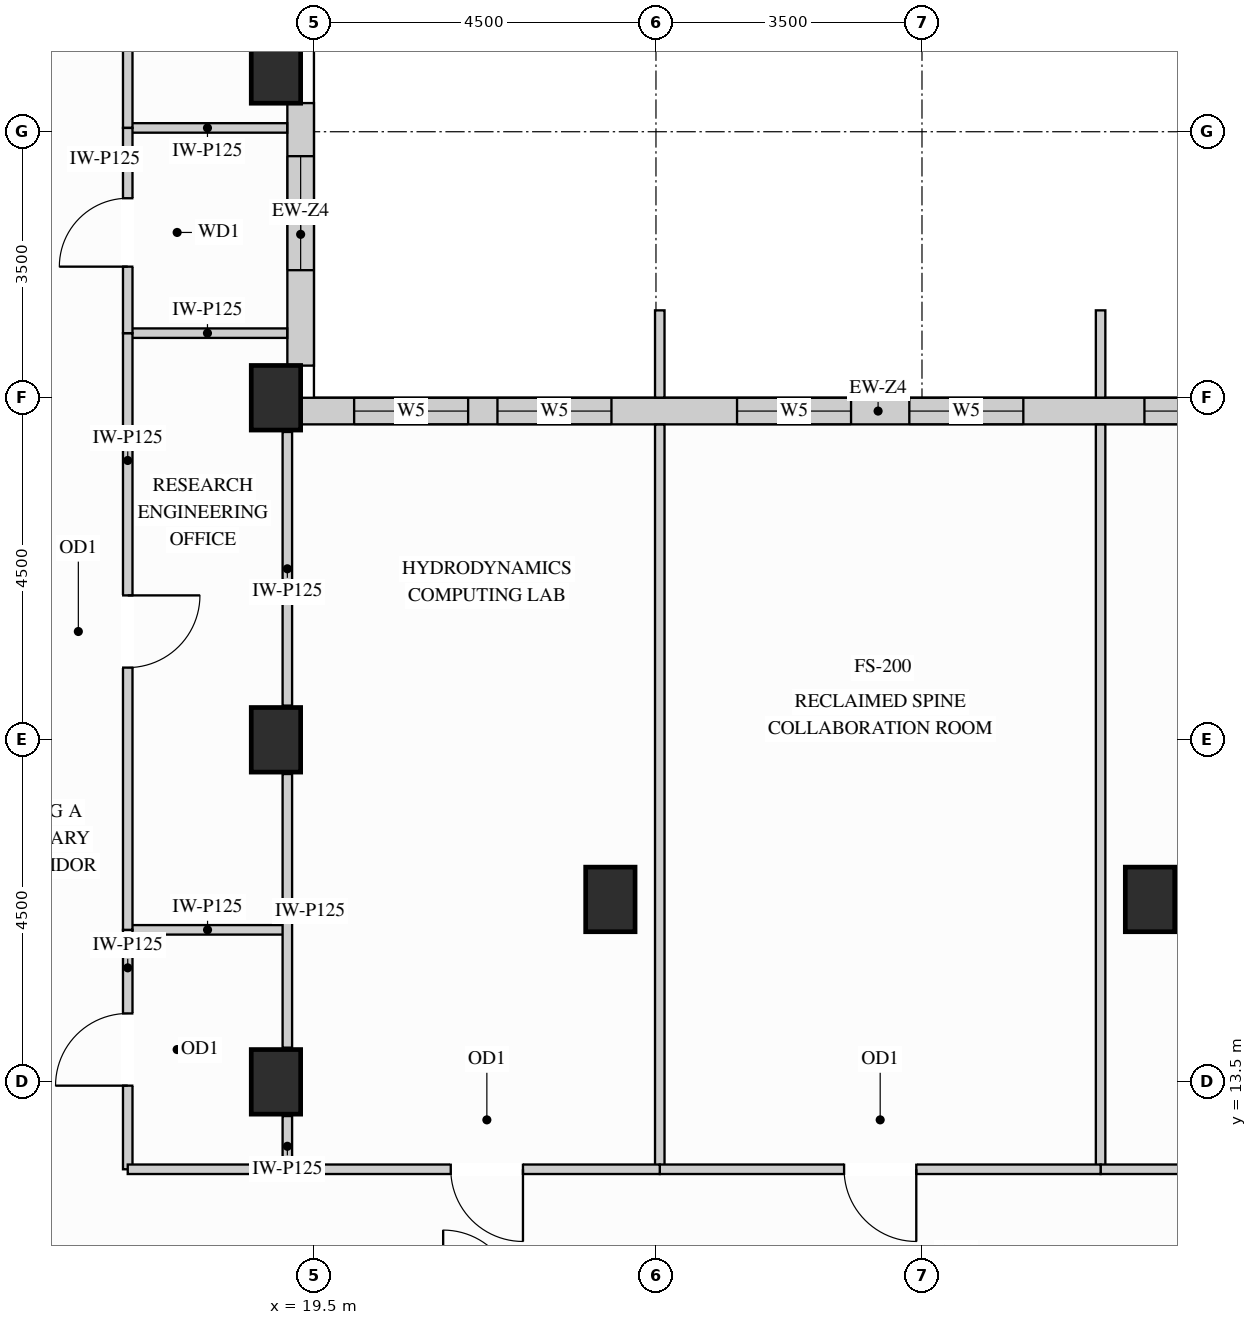
"""IFC4 building model, lengths in metres.
Left out: names, types, materials, properties, quantities, classifications, styles, units other than length and angle.
Written with IfcOpenShell. Run it as: python <this file> out.ifc"""

import sys

from ifc_helpers import new_model, si_unit, direction, frame, frame_2d, origin, origin_2d, place, context, subcontext, project, spatial, rectangle, extrude, source, transform, mapped, element, fill, save


model = new_model("IFC4")
c1 = context("Model", 3, precision=1e-05, world=origin(), true_north=direction((0.0, 1.0)))
c2 = subcontext(c1, "Body", "Model", "MODEL_VIEW")
j1 = project(units=[si_unit("LENGTHUNIT", "METRE"), si_unit("PLANEANGLEUNIT", "RADIAN")], contexts=[c1])
p1 = place(None, origin())
s1 = spatial("IfcSite", under=j1, at=p1, CompositionType="ELEMENT")
p2 = place(p1, origin())
s2 = spatial("IfcBuilding", under=s1, at=p2, CompositionType="ELEMENT")
p3 = place(p2, frame((0.0, 0.0, 252.0)))
s3 = spatial("IfcBuildingStorey", under=s2, at=p3, CompositionType="ELEMENT", Elevation=252.0)
m1 = source(origin(), c2, "Body", "SweptSolid", [
    extrude(rectangle(XDim=0.65, YDim=0.85, at=origin_2d()), origin(), (0.0, 0.0, 1.0), 3.4),
])
for number, where, z_axis, x_axis in (
    (1, (19.0, 13.5, 0.0), (0.0, 0.0, 1.0), (1.0, 0.0, 0.0)),
    (2, (19.0, 18.0, 0.0), (0.0, 0.0, 1.0), (1.0, 0.0, 0.0)),
    (3, (19.0, 22.5, 0.0), (0.0, 0.0, 1.0), (1.0, 0.0, 0.0)),
    (4, (19.0, 26.8, 0.0), (0.0, 0.0, 1.0), (1.0, 0.0, 0.0)),
    (5, (23.4, 15.9, 0.0), (0.0, 0.0, 1.0), (1.0, 0.0, 0.0)),
    (6, (30.5, 15.9, 0.0), (0.0, 0.0, 1.0), (1.0, 0.0, 0.0)),
):
    element("IfcColumn", number, at=place(p3, frame(where, z_axis=z_axis, x_axis=x_axis)), inside=s3, PredefinedType="COLUMN", context=c2, shape_type="MappedRepresentation", body=[
        mapped(m1, transform((0.0, 0.0, 0.0), x_axis=(1.0, 0.0, 0.0), y_axis=(0.0, 1.0, 0.0), z_axis=(0.0, 0.0, 1.0))),
    ])
p4 = place(p3, frame((34.4, 22.325, 0.0), z_axis=(0.0, 0.0, 1.0), x_axis=(-1.0, 0.0, 0.0)))
e7 = element("IfcWall", 7, at=p4, inside=s3, PredefinedType="SOLIDWALL", context=c2, shape_type="SweptSolid", body=[
    extrude(rectangle(XDim=15.077, YDim=0.35, at=frame_2d((7.539, 0.0))), origin(), (0.0, 0.0, 1.0), 3.385),
])
p5 = place(p4, frame((0.647, 0.0, 0.78)))
e8 = element("IfcOpeningElement", 8, at=p5, cuts=e7, PredefinedType="OPENING", context=c2, shape_type="SweptSolid", body=[
    extrude(rectangle(XDim=1.5, YDim=2.0, at=frame_2d((0.75, 1.0))), frame((0.0, 0.185, 0.0), z_axis=(0.0, -1.0, 0.0), x_axis=(1.0, 0.0, 0.0)), (0.0, 0.0, 1.0), 0.37),
])
p6 = place(p4, frame((2.473, 0.0, 0.78)))
e9 = element("IfcOpeningElement", 9, at=p6, cuts=e7, PredefinedType="OPENING", context=c2, shape_type="SweptSolid", body=[
    extrude(rectangle(XDim=1.5, YDim=2.0, at=frame_2d((0.75, 1.0))), frame((0.0, 0.185, 0.0), z_axis=(0.0, -1.0, 0.0), x_axis=(1.0, 0.0, 0.0)), (0.0, 0.0, 1.0), 0.37),
])
p7 = place(p4, frame((5.567, 0.0, 0.78)))
e10 = element("IfcOpeningElement", 10, at=p7, cuts=e7, PredefinedType="OPENING", context=c2, shape_type="SweptSolid", body=[
    extrude(rectangle(XDim=1.5, YDim=2.0, at=frame_2d((0.75, 1.0))), frame((0.0, 0.185, 0.0), z_axis=(0.0, -1.0, 0.0), x_axis=(1.0, 0.0, 0.0)), (0.0, 0.0, 1.0), 0.37),
])
p8 = place(p4, frame((7.833, 0.0, 0.78)))
e11 = element("IfcOpeningElement", 11, at=p8, cuts=e7, PredefinedType="OPENING", context=c2, shape_type="SweptSolid", body=[
    extrude(rectangle(XDim=1.5, YDim=2.0, at=frame_2d((0.75, 1.0))), frame((0.0, 0.185, 0.0), z_axis=(0.0, -1.0, 0.0), x_axis=(1.0, 0.0, 0.0)), (0.0, 0.0, 1.0), 0.37),
])
p9 = place(p4, frame((10.986, 0.0, 0.78)))
e12 = element("IfcOpeningElement", 12, at=p9, cuts=e7, PredefinedType="OPENING", context=c2, shape_type="SweptSolid", body=[
    extrude(rectangle(XDim=1.5, YDim=2.0, at=frame_2d((0.75, 1.0))), frame((0.0, 0.185, 0.0), z_axis=(0.0, -1.0, 0.0), x_axis=(1.0, 0.0, 0.0)), (0.0, 0.0, 1.0), 0.37),
])
p10 = place(p4, frame((12.871, 0.0, 0.78)))
e13 = element("IfcOpeningElement", 13, at=p10, cuts=e7, PredefinedType="OPENING", context=c2, shape_type="SweptSolid", body=[
    extrude(rectangle(XDim=1.5, YDim=2.0, at=frame_2d((0.75, 1.0))), frame((0.0, 0.185, 0.0), z_axis=(0.0, -1.0, 0.0), x_axis=(1.0, 0.0, 0.0)), (0.0, 0.0, 1.0), 0.37),
])
p11 = place(p3, frame((19.325, 22.923, 0.0), z_axis=(0.0, 0.0, 1.0), x_axis=(0.0, 1.0, 0.0)))
e14 = element("IfcWall", 14, at=p11, inside=s3, PredefinedType="SOLIDWALL", context=c2, shape_type="SweptSolid", body=[
    extrude(rectangle(XDim=3.454, YDim=0.35, at=frame_2d((1.727, 0.0))), origin(), (0.0, 0.0, 1.0), 2.619),
])
p12 = place(p11, frame((1.256, 0.0, 0.78)))
e15 = element("IfcOpeningElement", 15, at=p12, cuts=e14, PredefinedType="OPENING", context=c2, shape_type="SweptSolid", body=[
    extrude(rectangle(XDim=1.5, YDim=1.659, at=frame_2d((0.75, 0.83))), frame((0.0, 0.185, 0.0), z_axis=(0.0, -1.0, 0.0), x_axis=(1.0, 0.0, 0.0)), (0.0, 0.0, 1.0), 0.37),
])
m2 = source(origin(), c2, "Body", "SweptSolid", [
    extrude(rectangle(XDim=2.1, YDim=0.125, at=frame_2d((1.05, 0.0))), origin(), (0.0, 0.0, 1.0), 3.385),
])
p13 = place(p3, frame((17.05, 15.5, 0.0), z_axis=(0.0, 0.0, 1.0), x_axis=(1.0, 0.0, 0.0)))
e16 = element("IfcWall", 16, at=p13, inside=s3, PredefinedType="PARTITIONING", context=c2, shape_type="MappedRepresentation", body=[
    mapped(m2, transform((0.0, 0.0, 0.0), x_axis=(1.0, 0.0, 0.0), y_axis=(0.0, 1.0, 0.0), z_axis=(0.0, 0.0, 1.0))),
])
m3 = source(origin(), c2, "Body", "SweptSolid", [
    extrude(rectangle(XDim=2.098, YDim=0.125, at=frame_2d((1.049, 0.0))), origin(), (0.0, 0.0, 1.0), 3.385),
])
for number, where, z_axis, x_axis in (
    (17, (17.05, 23.35, 0.0), (0.0, 0.0, 1.0), (1.0, 0.0, 0.0)),
    (18, (17.05, 26.05, 0.0), (0.0, 0.0, 1.0), (1.0, 0.0, 0.0)),
):
    element("IfcWall", number, at=place(p3, frame(where, z_axis=z_axis, x_axis=x_axis)), inside=s3, PredefinedType="PARTITIONING", context=c2, shape_type="MappedRepresentation", body=[
        mapped(m3, transform((0.0, 0.0, 0.0), x_axis=(1.0, 0.0, 0.0), y_axis=(0.0, 1.0, 0.0), z_axis=(0.0, 0.0, 1.0))),
    ])
m4 = source(origin(), c2, "Body", "SweptSolid", [
    extrude(rectangle(XDim=0.7, YDim=0.125, at=frame_2d((0.35, 0.0))), origin(), (0.0, 0.0, 1.0), 2.773),
])
p14 = place(p3, frame((19.15, 12.35, 0.0), z_axis=(0.0, 0.0, 1.0), x_axis=(0.0, 1.0, 0.0)))
e19 = element("IfcWall", 19, at=p14, inside=s3, PredefinedType="PARTITIONING", context=c2, shape_type="MappedRepresentation", body=[
    mapped(m4, transform((0.0, 0.0, 0.0), x_axis=(1.0, 0.0, 0.0), y_axis=(0.0, 1.0, 0.0), z_axis=(0.0, 0.0, 1.0))),
])
m5 = source(origin(), c2, "Body", "SweptSolid", [
    extrude(rectangle(XDim=3.6, YDim=0.125, at=frame_2d((1.8, 0.0))), origin(), (0.0, 0.0, 1.0), 2.773),
])
for number, where, z_axis, x_axis in (
    (20, (19.15, 13.95, 0.0), (0.0, 0.0, 1.0), (0.0, 1.0, 0.0)),
    (21, (19.15, 18.45, 0.0), (0.0, 0.0, 1.0), (0.0, 1.0, 0.0)),
):
    element("IfcWall", number, at=place(p3, frame(where, z_axis=z_axis, x_axis=x_axis)), inside=s3, PredefinedType="PARTITIONING", context=c2, shape_type="MappedRepresentation", body=[
        mapped(m5, transform((0.0, 0.0, 0.0), x_axis=(1.0, 0.0, 0.0), y_axis=(0.0, 1.0, 0.0), z_axis=(0.0, 0.0, 1.0))),
    ])
p15 = place(p3, frame((17.05, 12.35, 0.0), z_axis=(0.0, 0.0, 1.0), x_axis=(0.0, 1.0, 0.0)))
e22 = element("IfcWall", 22, at=p15, inside=s3, PredefinedType="PARTITIONING", context=c2, shape_type="SweptSolid", body=[
    extrude(rectangle(XDim=3.15, YDim=0.125, at=frame_2d((1.575, 0.0))), origin(), (0.0, 0.0, 1.0), 3.385),
])
p16 = place(p15, frame((1.1, 0.0, 0.0)))
e23 = element("IfcOpeningElement", 23, at=p16, cuts=e22, PredefinedType="OPENING", context=c2, shape_type="SweptSolid", body=[
    extrude(rectangle(XDim=0.95, YDim=2.15, at=frame_2d((0.475, 1.075))), frame((0.0, 0.073, 0.0), z_axis=(0.0, -1.0, 0.0), x_axis=(1.0, 0.0, 0.0)), (0.0, 0.0, 1.0), 0.145),
])
p17 = place(p3, frame((17.05, 15.5, 0.0), z_axis=(0.0, 0.0, 1.0), x_axis=(0.0, 1.0, 0.0)))
e24 = element("IfcWall", 24, at=p17, inside=s3, PredefinedType="PARTITIONING", context=c2, shape_type="SweptSolid", body=[
    extrude(rectangle(XDim=7.85, YDim=0.125, at=frame_2d((3.925, 0.0))), origin(), (0.0, 0.0, 1.0), 3.385),
])
p18 = place(p17, frame((3.45, 0.0, 0.0)))
e25 = element("IfcOpeningElement", 25, at=p18, cuts=e24, PredefinedType="OPENING", context=c2, shape_type="SweptSolid", body=[
    extrude(rectangle(XDim=0.95, YDim=2.15, at=frame_2d((0.475, 1.075))), frame((0.0, 0.073, 0.0), z_axis=(0.0, -1.0, 0.0), x_axis=(1.0, 0.0, 0.0)), (0.0, 0.0, 1.0), 0.145),
])
p19 = place(p3, frame((17.05, 26.05, 0.0), z_axis=(0.0, 0.0, 1.0), x_axis=(0.0, 1.0, 0.0)))
e26 = element("IfcWall", 26, at=p19, inside=s3, PredefinedType="PARTITIONING", context=c2, shape_type="SweptSolid", body=[
    extrude(rectangle(XDim=6.8, YDim=0.125, at=frame_2d((3.4, 0.0))), origin(), (0.0, 0.0, 1.0), 3.385),
])
p20 = place(p19, frame((2.925, 0.0, 0.0)))
e27 = element("IfcOpeningElement", 27, at=p20, cuts=e26, PredefinedType="OPENING", context=c2, shape_type="SweptSolid", body=[
    extrude(rectangle(XDim=0.95, YDim=2.15, at=frame_2d((0.475, 1.075))), frame((0.0, 0.073, 0.0), z_axis=(0.0, -1.0, 0.0), x_axis=(1.0, 0.0, 0.0)), (0.0, 0.0, 1.0), 0.145),
])
p21 = place(p3, frame((17.05, 23.35, 0.0), z_axis=(0.0, 0.0, 1.0), x_axis=(0.0, 1.0, 0.0)))
e28 = element("IfcWall", 28, at=p21, inside=s3, PredefinedType="PARTITIONING", context=c2, shape_type="SweptSolid", body=[
    extrude(rectangle(XDim=2.7, YDim=0.125, at=frame_2d((1.35, 0.0))), origin(), (0.0, 0.0, 1.0), 3.385),
])
p22 = place(p21, frame((0.875, 0.0, 0.0)))
e29 = element("IfcOpeningElement", 29, at=p22, cuts=e28, PredefinedType="OPENING", context=c2, shape_type="SweptSolid", body=[
    extrude(rectangle(XDim=0.9, YDim=2.15, at=frame_2d((0.45, 1.075))), frame((0.0, 0.073, 0.0), z_axis=(0.0, -1.0, 0.0), x_axis=(1.0, 0.0, 0.0)), (0.0, 0.0, 1.0), 0.145),
])
m6 = source(origin(), c2, "Body", "SweptSolid", [
    extrude(rectangle(XDim=9.798, YDim=0.125, at=frame_2d((4.899, 0.0))), origin(), (0.0, 0.0, 1.0), 3.385),
])
p23 = place(p3, frame((24.05, 12.35, 0.0), z_axis=(0.0, 0.0, 1.0), x_axis=(0.0, 1.0, 0.0)))
e30 = element("IfcWall", 30, at=p23, inside=s3, PredefinedType="PARTITIONING", context=c2, shape_type="MappedRepresentation", body=[
    mapped(m6, transform((0.0, 0.0, 0.0), x_axis=(1.0, 0.0, 0.0), y_axis=(0.0, 1.0, 0.0), z_axis=(0.0, 0.0, 1.0))),
])
m7 = source(origin(), c2, "Body", "SweptSolid", [
    extrude(rectangle(XDim=1.148, YDim=0.125, at=frame_2d((0.574, 0.0))), origin(), (0.0, 0.0, 1.0), 3.385),
])
p24 = place(p3, frame((24.05, 22.502, 0.0), z_axis=(0.0, 0.0, 1.0), x_axis=(0.0, 1.0, 0.0)))
e31 = element("IfcWall", 31, at=p24, inside=s3, PredefinedType="PARTITIONING", context=c2, shape_type="MappedRepresentation", body=[
    mapped(m7, transform((0.0, 0.0, 0.0), x_axis=(1.0, 0.0, 0.0), y_axis=(0.0, 1.0, 0.0), z_axis=(0.0, 0.0, 1.0))),
])
p25 = place(p3, frame((29.85, 12.35, 0.0), z_axis=(0.0, 0.0, 1.0), x_axis=(0.0, 1.0, 0.0)))
e32 = element("IfcWall", 32, at=p25, inside=s3, PredefinedType="PARTITIONING", context=c2, shape_type="MappedRepresentation", body=[
    mapped(m6, transform((0.0, 0.0, 0.0), x_axis=(1.0, 0.0, 0.0), y_axis=(0.0, 1.0, 0.0), z_axis=(0.0, 0.0, 1.0))),
])
p26 = place(p3, frame((29.85, 22.502, 0.0), z_axis=(0.0, 0.0, 1.0), x_axis=(0.0, 1.0, 0.0)))
e33 = element("IfcWall", 33, at=p26, inside=s3, PredefinedType="PARTITIONING", context=c2, shape_type="MappedRepresentation", body=[
    mapped(m7, transform((0.0, 0.0, 0.0), x_axis=(1.0, 0.0, 0.0), y_axis=(0.0, 1.0, 0.0), z_axis=(0.0, 0.0, 1.0))),
])
p27 = place(p3, frame((29.85, 12.35, 0.0), z_axis=(0.0, 0.0, 1.0), x_axis=(1.0, 0.0, 0.0)))
e34 = element("IfcWall", 34, at=p27, inside=s3, PredefinedType="PARTITIONING", context=c2, shape_type="SweptSolid", body=[
    extrude(rectangle(XDim=4.55, YDim=0.125, at=frame_2d((2.275, 0.0))), origin(), (0.0, 0.0, 1.0), 3.385),
])
p28 = place(p27, frame((1.8, 0.0, 0.0)))
e35 = element("IfcOpeningElement", 35, at=p28, cuts=e34, PredefinedType="OPENING", context=c2, shape_type="SweptSolid", body=[
    extrude(rectangle(XDim=0.95, YDim=2.15, at=frame_2d((0.475, 1.075))), frame((0.0, 0.073, 0.0), z_axis=(0.0, -1.0, 0.0), x_axis=(1.0, 0.0, 0.0)), (0.0, 0.0, 1.0), 0.145),
])
p29 = place(p3, frame((24.05, 12.35, 0.0), z_axis=(0.0, 0.0, 1.0), x_axis=(1.0, 0.0, 0.0)))
e36 = element("IfcWall", 36, at=p29, inside=s3, PredefinedType="PARTITIONING", context=c2, shape_type="SweptSolid", body=[
    extrude(rectangle(XDim=5.8, YDim=0.125, at=frame_2d((2.9, 0.0))), origin(), (0.0, 0.0, 1.0), 3.385),
])
p30 = place(p29, frame((2.425, 0.0, 0.0)))
e37 = element("IfcOpeningElement", 37, at=p30, cuts=e36, PredefinedType="OPENING", context=c2, shape_type="SweptSolid", body=[
    extrude(rectangle(XDim=0.95, YDim=2.15, at=frame_2d((0.475, 1.075))), frame((0.0, 0.073, 0.0), z_axis=(0.0, -1.0, 0.0), x_axis=(1.0, 0.0, 0.0)), (0.0, 0.0, 1.0), 0.145),
])
m8 = source(origin(), c2, "Body", "SweptSolid", [
    extrude(rectangle(XDim=2.45, YDim=0.125, at=frame_2d((1.225, 0.0))), origin(), (0.0, 0.0, 1.0), 3.385),
])
p31 = place(p3, frame((17.05, 12.35, 0.0), z_axis=(0.0, 0.0, 1.0), x_axis=(1.0, 0.0, 0.0)))
e38 = element("IfcWall", 38, at=p31, inside=s3, PredefinedType="PARTITIONING", context=c2, shape_type="MappedRepresentation", body=[
    mapped(m8, transform((0.0, 0.0, 0.0), x_axis=(1.0, 0.0, 0.0), y_axis=(0.0, 1.0, 0.0), z_axis=(0.0, 0.0, 1.0))),
])
p32 = place(p3, frame((19.5, 12.35, 0.0), z_axis=(0.0, 0.0, 1.0), x_axis=(1.0, 0.0, 0.0)))
e39 = element("IfcWall", 39, at=p32, inside=s3, PredefinedType="PARTITIONING", context=c2, shape_type="SweptSolid", body=[
    extrude(rectangle(XDim=4.55, YDim=0.125, at=frame_2d((2.275, 0.0))), origin(), (0.0, 0.0, 1.0), 3.385),
])
p33 = place(p32, frame((1.8, 0.0, 0.0)))
e40 = element("IfcOpeningElement", 40, at=p33, cuts=e39, PredefinedType="OPENING", context=c2, shape_type="SweptSolid", body=[
    extrude(rectangle(XDim=0.95, YDim=2.15, at=frame_2d((0.475, 1.075))), frame((0.0, 0.073, 0.0), z_axis=(0.0, -1.0, 0.0), x_axis=(1.0, 0.0, 0.0)), (0.0, 0.0, 1.0), 0.145),
])
m9 = source(origin(), c2, "Body", "SweptSolid", [
    extrude(rectangle(XDim=0.95, YDim=2.15, at=frame_2d((0.475, 1.075))), frame((0.0, 0.025, 0.0), z_axis=(0.0, -1.0, 0.0), x_axis=(1.0, 0.0, 0.0)), (0.0, 0.0, 1.0), 0.05),
])
p34 = place(p16, origin())
e41 = element("IfcDoor", 41, at=p34, inside=s3, OperationType="SINGLE_SWING_LEFT", PredefinedType="DOOR", context=c2, shape_type="MappedRepresentation", body=[
    mapped(m9, transform((0.0, 0.0, 0.0), x_axis=(1.0, 0.0, 0.0), y_axis=(0.0, 1.0, 0.0), z_axis=(0.0, 0.0, 1.0))),
])
fill(e23, e41)
p35 = place(p18, origin())
e42 = element("IfcDoor", 42, at=p35, inside=s3, OperationType="SINGLE_SWING_RIGHT", PredefinedType="DOOR", context=c2, shape_type="MappedRepresentation", body=[
    mapped(m9, transform((0.0, 0.0, 0.0), x_axis=(1.0, 0.0, 0.0), y_axis=(0.0, 1.0, 0.0), z_axis=(0.0, 0.0, 1.0))),
])
fill(e25, e42)
p36 = place(p30, origin())
e43 = element("IfcDoor", 43, at=p36, inside=s3, OperationType="SINGLE_SWING_RIGHT", PredefinedType="DOOR", context=c2, shape_type="MappedRepresentation", body=[
    mapped(m9, transform((0.0, 0.0, 0.0), x_axis=(1.0, 0.0, 0.0), y_axis=(0.0, 1.0, 0.0), z_axis=(0.0, 0.0, 1.0))),
])
fill(e37, e43)
p37 = place(p33, origin())
e44 = element("IfcDoor", 44, at=p37, inside=s3, OperationType="SINGLE_SWING_RIGHT", PredefinedType="DOOR", context=c2, shape_type="MappedRepresentation", body=[
    mapped(m9, transform((0.0, 0.0, 0.0), x_axis=(1.0, 0.0, 0.0), y_axis=(0.0, 1.0, 0.0), z_axis=(0.0, 0.0, 1.0))),
])
fill(e40, e44)
m10 = source(origin(), c2, "Body", "SweptSolid", [
    extrude(rectangle(XDim=0.9, YDim=2.15, at=frame_2d((0.45, 1.075))), frame((0.0, 0.025, 0.0), z_axis=(0.0, -1.0, 0.0), x_axis=(1.0, 0.0, 0.0)), (0.0, 0.0, 1.0), 0.05),
])
p38 = place(p22, origin())
e45 = element("IfcDoor", 45, at=p38, inside=s3, OperationType="SINGLE_SWING_LEFT", PredefinedType="DOOR", context=c2, shape_type="MappedRepresentation", body=[
    mapped(m10, transform((0.0, 0.0, 0.0), x_axis=(1.0, 0.0, 0.0), y_axis=(0.0, 1.0, 0.0), z_axis=(0.0, 0.0, 1.0))),
])
fill(e29, e45)
m11 = source(origin(), c2, "Body", "SweptSolid", [
    extrude(rectangle(XDim=1.5, YDim=2.0, at=frame_2d((0.75, 1.0))), frame((0.0, 0.03, 0.0), z_axis=(0.0, -1.0, 0.0), x_axis=(1.0, 0.0, 0.0)), (0.0, 0.0, 1.0), 0.06),
])
p39 = place(p6, origin())
e46 = element("IfcWindow", 46, at=p39, inside=s3, PartitioningType="SINGLE_PANEL", PredefinedType="WINDOW", context=c2, shape_type="MappedRepresentation", body=[
    mapped(m11, transform((0.0, 0.0, 0.0), x_axis=(1.0, 0.0, 0.0), y_axis=(0.0, 1.0, 0.0), z_axis=(0.0, 0.0, 1.0))),
])
fill(e9, e46)
p40 = place(p7, origin())
e47 = element("IfcWindow", 47, at=p40, inside=s3, PartitioningType="SINGLE_PANEL", PredefinedType="WINDOW", context=c2, shape_type="MappedRepresentation", body=[
    mapped(m11, transform((0.0, 0.0, 0.0), x_axis=(1.0, 0.0, 0.0), y_axis=(0.0, 1.0, 0.0), z_axis=(0.0, 0.0, 1.0))),
])
fill(e10, e47)
p41 = place(p8, origin())
e48 = element("IfcWindow", 48, at=p41, inside=s3, PartitioningType="SINGLE_PANEL", PredefinedType="WINDOW", context=c2, shape_type="MappedRepresentation", body=[
    mapped(m11, transform((0.0, 0.0, 0.0), x_axis=(1.0, 0.0, 0.0), y_axis=(0.0, 1.0, 0.0), z_axis=(0.0, 0.0, 1.0))),
])
fill(e11, e48)
p42 = place(p9, origin())
e49 = element("IfcWindow", 49, at=p42, inside=s3, PartitioningType="SINGLE_PANEL", PredefinedType="WINDOW", context=c2, shape_type="MappedRepresentation", body=[
    mapped(m11, transform((0.0, 0.0, 0.0), x_axis=(1.0, 0.0, 0.0), y_axis=(0.0, 1.0, 0.0), z_axis=(0.0, 0.0, 1.0))),
])
fill(e12, e49)
p43 = place(p10, origin())
e50 = element("IfcWindow", 50, at=p43, inside=s3, PartitioningType="SINGLE_PANEL", PredefinedType="WINDOW", context=c2, shape_type="MappedRepresentation", body=[
    mapped(m11, transform((0.0, 0.0, 0.0), x_axis=(1.0, 0.0, 0.0), y_axis=(0.0, 1.0, 0.0), z_axis=(0.0, 0.0, 1.0))),
])
fill(e13, e50)
m12 = source(origin(), c2, "Body", "SweptSolid", [
    extrude(rectangle(XDim=1.5, YDim=1.659, at=frame_2d((0.75, 0.83))), frame((0.0, 0.03, 0.0), z_axis=(0.0, -1.0, 0.0), x_axis=(1.0, 0.0, 0.0)), (0.0, 0.0, 1.0), 0.06),
])
p44 = place(p12, origin())
e51 = element("IfcWindow", 51, at=p44, inside=s3, PartitioningType="SINGLE_PANEL", PredefinedType="WINDOW", context=c2, shape_type="MappedRepresentation", body=[
    mapped(m12, transform((0.0, 0.0, 0.0), x_axis=(1.0, 0.0, 0.0), y_axis=(0.0, 1.0, 0.0), z_axis=(0.0, 0.0, 1.0))),
])
fill(e15, e51)
save(model, sys.argv[1])
